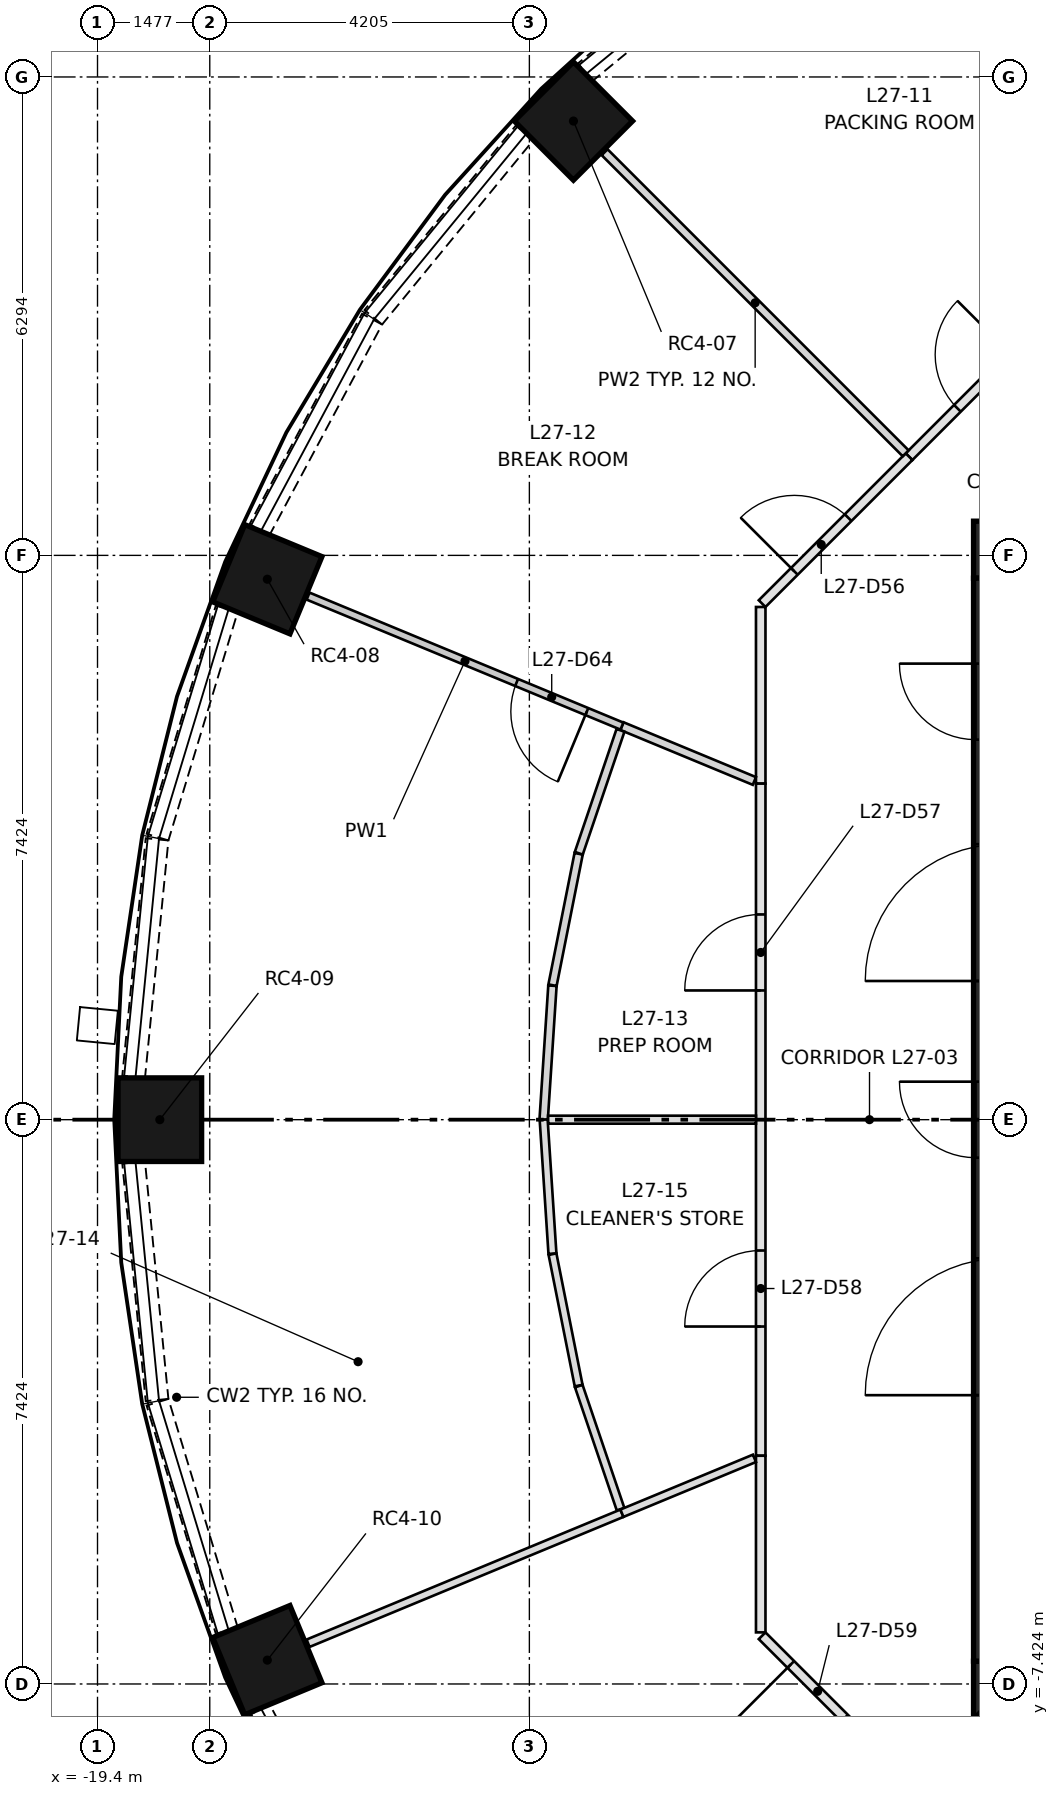
"""IFC4 building model, lengths in metres.
Left out: names, types, materials, properties, quantities, classifications, styles, units other than length and angle.
Written with IfcOpenShell. Run it as: python <this file> out.ifc"""

import sys

from ifc_helpers import new_model, si_unit, direction, frame, frame_2d, origin, origin_2d, place, context, subcontext, project, spatial, rectangle, extrude, element, fill, save


model = new_model("IFC4")
c1 = context("Model", 3, precision=1e-05, world=origin(), true_north=direction((0.0, 1.0)))
c2 = subcontext(c1, "Body", "Model", "MODEL_VIEW")
j1 = project(units=[si_unit("LENGTHUNIT", "METRE"), si_unit("PLANEANGLEUNIT", "RADIAN")], contexts=[c1])
p1 = place(None, origin())
s1 = spatial("IfcSite", under=j1, at=p1, CompositionType="ELEMENT")
p2 = place(p1, origin())
s2 = spatial("IfcBuilding", under=s1, at=p2, CompositionType="ELEMENT")
p3 = place(p2, frame((0.0, 0.0, 105.6)))
s3 = spatial("IfcBuildingStorey", under=s2, at=p3, CompositionType="ELEMENT", Elevation=105.6)
for number, where, z_axis, x_axis in (
    (1, (-13.138, 13.138, 0.0), (0.0, 0.0, 1.0), (-0.707, 0.707, 0.0)),
    (2, (-17.166, 7.11, 0.0), (0.0, 0.0, 1.0), (-0.924, 0.383, 0.0)),
    (3, (-18.58, 0.0, 0.0), (0.0, 0.0, 1.0), (-1.0, 0.0, 0.0)),
    (4, (-17.166, -7.11, 0.0), (0.0, 0.0, 1.0), (-0.924, -0.383, 0.0)),
):
    element("IfcColumn", number, at=place(p3, frame(where, z_axis=z_axis, x_axis=x_axis)), inside=s3, PredefinedType="COLUMN", context=c2, shape_type="SweptSolid", body=[
        extrude(rectangle(XDim=1.1, YDim=1.1, at=origin_2d()), origin(), (0.0, 0.0, 1.0), 3.65),
    ])
for number, where, z_axis, x_axis in (
    (5, (-7.874, -7.499, 0.0), (0.0, 0.0, 1.0), (1.0, 0.0, 0.0)),
    (6, (-7.874, 7.499, 0.0), (0.0, 0.0, 1.0), (1.0, 0.0, 0.0)),
):
    element("IfcWall", number, at=place(p3, frame(where, z_axis=z_axis, x_axis=x_axis)), inside=s3, PredefinedType="SHEAR", context=c2, shape_type="SweptSolid", body=[
        extrude(rectangle(XDim=15.748, YDim=0.75, at=frame_2d((7.874, 0.0))), origin(), (0.0, 0.0, 1.0), 3.65),
    ])
p4 = place(p3, frame((-7.499, -7.124, 0.0), z_axis=(0.0, 0.0, 1.0), x_axis=(0.0, 1.0, 0.0)))
e7 = element("IfcWall", 7, at=p4, inside=s3, PredefinedType="SHEAR", context=c2, shape_type="SweptSolid", body=[
    extrude(rectangle(XDim=14.248, YDim=0.75, at=frame_2d((7.124, 0.0))), origin(), (0.0, 0.0, 1.0), 3.65),
])
p5 = place(p4, frame((6.624, 0.0, 0.0)))
e8 = element("IfcOpeningElement", 8, at=p5, cuts=e7, PredefinedType="OPENING", context=c2, shape_type="SweptSolid", body=[
    extrude(rectangle(XDim=1.0, YDim=2.1, at=frame_2d((0.5, 1.05))), frame((0.0, 0.385, 0.0), z_axis=(0.0, -1.0, 0.0), x_axis=(1.0, 0.0, 0.0)), (0.0, 0.0, 1.0), 0.77),
])
p6 = place(p4, frame((3.5, 0.0, 0.0)))
e9 = element("IfcOpeningElement", 9, at=p6, cuts=e7, PredefinedType="OPENING", context=c2, shape_type="SweptSolid", body=[
    extrude(rectangle(XDim=1.8, YDim=2.1, at=frame_2d((0.9, 1.05))), frame((0.0, 0.385, 0.0), z_axis=(0.0, -1.0, 0.0), x_axis=(1.0, 0.0, 0.0)), (0.0, 0.0, 1.0), 0.77),
])
p7 = place(p4, frame((8.948, 0.0, 0.0)))
e10 = element("IfcOpeningElement", 10, at=p7, cuts=e7, PredefinedType="OPENING", context=c2, shape_type="SweptSolid", body=[
    extrude(rectangle(XDim=1.8, YDim=2.1, at=frame_2d((0.9, 1.05))), frame((0.0, 0.385, 0.0), z_axis=(0.0, -1.0, 0.0), x_axis=(1.0, 0.0, 0.0)), (0.0, 0.0, 1.0), 0.77),
])
p8 = place(p4, frame((12.124, 0.0, 0.0)))
e11 = element("IfcOpeningElement", 11, at=p8, cuts=e7, PredefinedType="OPENING", context=c2, shape_type="SweptSolid", body=[
    extrude(rectangle(XDim=1.0, YDim=2.1, at=frame_2d((0.5, 1.05))), frame((0.0, 0.385, 0.0), z_axis=(0.0, -1.0, 0.0), x_axis=(1.0, 0.0, 0.0)), (0.0, 0.0, 1.0), 0.77),
])
for number, where, z_axis, x_axis in (
    (12, (-10.557, 15.771, 0.0), (0.0, 0.0, 1.0), (-0.773, -0.634, 0.0)),
    (13, (-13.781, 12.983, 0.0), (0.0, 0.0, 1.0), (-0.634, -0.773, 0.0)),
):
    element("IfcWall", number, at=place(p3, frame(where, z_axis=z_axis, x_axis=x_axis)), inside=s3, PredefinedType="SOLIDWALL", context=c2, shape_type="SweptSolid", body=[
        extrude(rectangle(XDim=3.139, YDim=0.3, at=frame_2d((1.569, 0.0))), origin(), (0.0, 0.0, 1.0), 0.9),
    ])
p9 = place(p3, frame((-15.788, 10.532, 0.0), z_axis=(0.0, 0.0, 1.0), x_axis=(-0.471375185282, -0.88193278355, 0.0)))
e14 = element("IfcWall", 14, at=p9, inside=s3, PredefinedType="SOLIDWALL", context=c2, shape_type="SweptSolid", body=[
    extrude(rectangle(XDim=3.139, YDim=0.3, at=frame_2d((1.57, 0.0))), origin(), (0.0, 0.0, 1.0), 0.9),
])
p10 = place(p3, frame((-17.699, 6.722, 0.0), z_axis=(0.0, 0.0, 1.0), x_axis=(-0.290214584271, -0.956961595403, 0.0)))
e15 = element("IfcWall", 15, at=p10, inside=s3, PredefinedType="SOLIDWALL", context=c2, shape_type="SweptSolid", body=[
    extrude(rectangle(XDim=3.139, YDim=0.3, at=frame_2d((1.57, 0.0))), origin(), (0.0, 0.0, 1.0), 0.9),
])
for number, where, z_axis, x_axis in (
    (16, (-18.616, 3.688, 0.0), (0.0, 0.0, 1.0), (-0.098, -0.995, 0.0)),
    (17, (-18.925, -0.564, 0.0), (0.0, 0.0, 1.0), (0.098, -0.995, 0.0)),
):
    element("IfcWall", number, at=place(p3, frame(where, z_axis=z_axis, x_axis=x_axis)), inside=s3, PredefinedType="SOLIDWALL", context=c2, shape_type="SweptSolid", body=[
        extrude(rectangle(XDim=3.139, YDim=0.3, at=frame_2d((1.57, 0.0))), origin(), (0.0, 0.0, 1.0), 0.9),
    ])
p11 = place(p3, frame((-18.611, -3.717, 0.0), z_axis=(0.0, 0.0, 1.0), x_axis=(0.290214584271, -0.956961595403, 0.0)))
e18 = element("IfcWall", 18, at=p11, inside=s3, PredefinedType="SOLIDWALL", context=c2, shape_type="SweptSolid", body=[
    extrude(rectangle(XDim=3.139, YDim=0.3, at=frame_2d((1.57, 0.0))), origin(), (0.0, 0.0, 1.0), 0.9),
])
p12 = place(p3, frame((-17.268, -7.763, 0.0), z_axis=(0.0, 0.0, 1.0), x_axis=(0.471375185282, -0.88193278355, 0.0)))
e19 = element("IfcWall", 19, at=p12, inside=s3, PredefinedType="SOLIDWALL", context=c2, shape_type="SweptSolid", body=[
    extrude(rectangle(XDim=3.139, YDim=0.3, at=frame_2d((1.57, 0.0))), origin(), (0.0, 0.0, 1.0), 0.9),
])
p13 = place(p3, frame((-8.722, 8.722, 0.0), z_axis=(0.0, 0.0, 1.0), x_axis=(0.707062130741, 0.707151428813, 0.0)))
e20 = element("IfcWall", 20, at=p13, inside=s3, PredefinedType="PARTITIONING", context=c2, shape_type="SweptSolid", body=[
    extrude(rectangle(XDim=2.734, YDim=0.125, at=frame_2d((1.367, 0.0))), origin(), (0.0, 0.0, 1.0), 3.3),
])
p14 = place(p13, frame((0.9, 0.0, 0.0)))
e21 = element("IfcOpeningElement", 21, at=p14, cuts=e20, PredefinedType="OPENING", context=c2, shape_type="SweptSolid", body=[
    extrude(rectangle(XDim=1.0, YDim=2.1, at=frame_2d((0.5, 1.05))), frame((0.0, 0.073, 0.0), z_axis=(0.0, -1.0, 0.0), x_axis=(1.0, 0.0, 0.0)), (0.0, 0.0, 1.0), 0.145),
])
p15 = place(p3, frame((-10.674, 4.421, 0.0), z_axis=(0.0, 0.0, 1.0), x_axis=(0.0, 1.0, 0.0)))
e22 = element("IfcWall", 22, at=p15, inside=s3, PredefinedType="PARTITIONING", context=c2, shape_type="SweptSolid", body=[
    extrude(rectangle(XDim=2.324, YDim=0.125, at=frame_2d((1.162, 0.0))), origin(), (0.0, 0.0, 1.0), 3.3),
])
p16 = place(p3, frame((-10.656, 6.789, 0.0), z_axis=(0.0, 0.0, 1.0), x_axis=(0.707151428813, 0.707062130741, 0.0)))
e23 = element("IfcWall", 23, at=p16, inside=s3, PredefinedType="PARTITIONING", context=c2, shape_type="SweptSolid", body=[
    extrude(rectangle(XDim=2.734, YDim=0.125, at=frame_2d((1.367, 0.0))), origin(), (0.0, 0.0, 1.0), 3.3),
])
p17 = place(p16, frame((0.6, 0.0, 0.0)))
e24 = element("IfcOpeningElement", 24, at=p17, cuts=e23, PredefinedType="OPENING", context=c2, shape_type="SweptSolid", body=[
    extrude(rectangle(XDim=1.0, YDim=2.1, at=frame_2d((0.5, 1.05))), frame((0.0, 0.073, 0.0), z_axis=(0.0, -1.0, 0.0), x_axis=(1.0, 0.0, 0.0)), (0.0, 0.0, 1.0), 0.145),
])
p18 = place(p3, frame((-10.674, 0.0, 0.0), z_axis=(0.0, 0.0, 1.0), x_axis=(0.0, 1.0, 0.0)))
e25 = element("IfcWall", 25, at=p18, inside=s3, PredefinedType="PARTITIONING", context=c2, shape_type="SweptSolid", body=[
    extrude(rectangle(XDim=4.421, YDim=0.125, at=frame_2d((2.211, 0.0))), origin(), (0.0, 0.0, 1.0), 3.3),
])
p19 = place(p18, frame((1.7, 0.0, 0.0)))
e26 = element("IfcOpeningElement", 26, at=p19, cuts=e25, PredefinedType="OPENING", context=c2, shape_type="SweptSolid", body=[
    extrude(rectangle(XDim=1.0, YDim=2.1, at=frame_2d((0.5, 1.05))), frame((0.0, 0.073, 0.0), z_axis=(0.0, -1.0, 0.0), x_axis=(1.0, 0.0, 0.0)), (0.0, 0.0, 1.0), 0.145),
])
p20 = place(p3, frame((-10.674, -4.421, 0.0), z_axis=(0.0, 0.0, 1.0), x_axis=(0.0, 1.0, 0.0)))
e27 = element("IfcWall", 27, at=p20, inside=s3, PredefinedType="PARTITIONING", context=c2, shape_type="SweptSolid", body=[
    extrude(rectangle(XDim=4.421, YDim=0.125, at=frame_2d((2.211, 0.0))), origin(), (0.0, 0.0, 1.0), 3.3),
])
p21 = place(p20, frame((1.7, 0.0, 0.0)))
e28 = element("IfcOpeningElement", 28, at=p21, cuts=e27, PredefinedType="OPENING", context=c2, shape_type="SweptSolid", body=[
    extrude(rectangle(XDim=1.0, YDim=2.1, at=frame_2d((0.5, 1.05))), frame((0.0, 0.073, 0.0), z_axis=(0.0, -1.0, 0.0), x_axis=(1.0, 0.0, 0.0)), (0.0, 0.0, 1.0), 0.145),
])
p22 = place(p3, frame((-10.674, -6.745, 0.0), z_axis=(0.0, 0.0, 1.0), x_axis=(0.0, 1.0, 0.0)))
e29 = element("IfcWall", 29, at=p22, inside=s3, PredefinedType="PARTITIONING", context=c2, shape_type="SweptSolid", body=[
    extrude(rectangle(XDim=2.324, YDim=0.125, at=frame_2d((1.162, 0.0))), origin(), (0.0, 0.0, 1.0), 3.3),
])
p23 = place(p3, frame((-8.722, -8.722, 0.0), z_axis=(0.0, 0.0, 1.0), x_axis=(-0.707151428813, 0.707062130741, 0.0)))
e30 = element("IfcWall", 30, at=p23, inside=s3, PredefinedType="PARTITIONING", context=c2, shape_type="SweptSolid", body=[
    extrude(rectangle(XDim=2.734, YDim=0.125, at=frame_2d((1.367, 0.0))), origin(), (0.0, 0.0, 1.0), 3.3),
])
p24 = place(p23, frame((1.2, 0.0, 0.0)))
e31 = element("IfcOpeningElement", 31, at=p24, cuts=e30, PredefinedType="OPENING", context=c2, shape_type="SweptSolid", body=[
    extrude(rectangle(XDim=1.0, YDim=2.1, at=frame_2d((0.5, 1.05))), frame((0.0, 0.073, 0.0), z_axis=(0.0, -1.0, 0.0), x_axis=(1.0, 0.0, 0.0)), (0.0, 0.0, 1.0), 0.145),
])
p25 = place(p3, frame((-8.767, 8.767, 0.0), z_axis=(0.0, 0.0, 1.0), x_axis=(-0.707106781187, 0.707106781187, 0.0)))
e32 = element("IfcWall", 32, at=p25, inside=s3, PredefinedType="PARTITIONING", context=c2, shape_type="SweptSolid", body=[
    extrude(rectangle(XDim=5.602, YDim=0.11, at=frame_2d((2.801, 0.0))), origin(), (0.0, 0.0, 1.0), 3.3),
])
p26 = place(p3, frame((-10.758, 4.456, 0.0), z_axis=(0.0, 0.0, 1.0), x_axis=(-0.923844847366, 0.382767158983, 0.0)))
e33 = element("IfcWall", 33, at=p26, inside=s3, PredefinedType="PARTITIONING", context=c2, shape_type="SweptSolid", body=[
    extrude(rectangle(XDim=1.886, YDim=0.11, at=frame_2d((0.943, 0.0))), origin(), (0.0, 0.0, 1.0), 3.3),
])
p27 = place(p3, frame((-12.5, 5.178, 0.0), z_axis=(0.0, 0.0, 1.0), x_axis=(-0.923895686767, 0.382644430213, 0.0)))
e34 = element("IfcWall", 34, at=p27, inside=s3, PredefinedType="PARTITIONING", context=c2, shape_type="SweptSolid", body=[
    extrude(rectangle(XDim=4.47, YDim=0.1, at=frame_2d((2.235, 0.0))), origin(), (0.0, 0.0, 1.0), 3.3),
])
p28 = place(p27, frame((0.5, 0.0, 0.0)))
e35 = element("IfcOpeningElement", 35, at=p28, cuts=e34, PredefinedType="OPENING", context=c2, shape_type="SweptSolid", body=[
    extrude(rectangle(XDim=1.0, YDim=2.1, at=frame_2d((0.5, 1.05))), frame((0.0, 0.06, 0.0), z_axis=(0.0, -1.0, 0.0), x_axis=(1.0, 0.0, 0.0)), (0.0, 0.0, 1.0), 0.12),
])
p29 = place(p3, frame((-13.53, 0.0, 0.0), z_axis=(0.0, 0.0, 1.0), x_axis=(0.06551898146, 0.997851323128, 0.0)))
e36 = element("IfcWall", 36, at=p29, inside=s3, PredefinedType="PARTITIONING", context=c2, shape_type="SweptSolid", body=[
    extrude(rectangle(XDim=1.766, YDim=0.11, at=frame_2d((0.883, 0.0))), origin(), (0.0, 0.0, 1.0), 3.3),
])
p30 = place(p3, frame((-13.414, 1.77, 0.0), z_axis=(0.0, 0.0, 1.0), x_axis=(0.195157142921, 0.980771986532, 0.0)))
e37 = element("IfcWall", 37, at=p30, inside=s3, PredefinedType="PARTITIONING", context=c2, shape_type="SweptSolid", body=[
    extrude(rectangle(XDim=1.763, YDim=0.11, at=frame_2d((0.881, 0.0))), origin(), (0.0, 0.0, 1.0), 3.3),
])
p31 = place(p3, frame((-13.068, 3.505, 0.0), z_axis=(0.0, 0.0, 1.0), x_axis=(0.321413111924, 0.946939074853, 0.0)))
e38 = element("IfcWall", 38, at=p31, inside=s3, PredefinedType="PARTITIONING", context=c2, shape_type="SweptSolid", body=[
    extrude(rectangle(XDim=1.708, YDim=0.11, at=frame_2d((0.854, 0.0))), origin(), (0.0, 0.0, 1.0), 3.3),
])
p32 = place(p3, frame((-10.737, 0.0, 0.0), z_axis=(0.0, 0.0, 1.0), x_axis=(-1.0, 0.0, 0.0)))
e39 = element("IfcWall", 39, at=p32, inside=s3, PredefinedType="PARTITIONING", context=c2, shape_type="SweptSolid", body=[
    extrude(rectangle(XDim=2.735, YDim=0.105, at=frame_2d((1.367, 0.0))), origin(), (0.0, 0.0, 1.0), 3.3),
])
p33 = place(p3, frame((-13.53, 0.0, 0.0), z_axis=(0.0, 0.0, 1.0), x_axis=(0.065509945756, -0.997851916372, 0.0)))
e40 = element("IfcWall", 40, at=p33, inside=s3, PredefinedType="PARTITIONING", context=c2, shape_type="SweptSolid", body=[
    extrude(rectangle(XDim=1.767, YDim=0.105, at=frame_2d((0.883, 0.0))), origin(), (0.0, 0.0, 1.0), 3.3),
])
p34 = place(p3, frame((-13.414, -1.769, 0.0), z_axis=(0.0, 0.0, 1.0), x_axis=(0.19513063546, -0.980777260699, 0.0)))
e41 = element("IfcWall", 41, at=p34, inside=s3, PredefinedType="PARTITIONING", context=c2, shape_type="SweptSolid", body=[
    extrude(rectangle(XDim=1.763, YDim=0.105, at=frame_2d((0.881, 0.0))), origin(), (0.0, 0.0, 1.0), 3.3),
])
p35 = place(p3, frame((-13.068, -3.505, 0.0), z_axis=(0.0, 0.0, 1.0), x_axis=(0.321490655205, -0.946912751322, 0.0)))
e42 = element("IfcWall", 42, at=p35, inside=s3, PredefinedType="PARTITIONING", context=c2, shape_type="SweptSolid", body=[
    extrude(rectangle(XDim=1.71, YDim=0.105, at=frame_2d((0.855, 0.0))), origin(), (0.0, 0.0, 1.0), 3.3),
])
p36 = place(p3, frame((-12.5, -5.178, 0.0), z_axis=(0.0, 0.0, 1.0), x_axis=(-0.923895686767, -0.382644430213, 0.0)))
e43 = element("IfcWall", 43, at=p36, inside=s3, PredefinedType="PARTITIONING", context=c2, shape_type="SweptSolid", body=[
    extrude(rectangle(XDim=4.47, YDim=0.105, at=frame_2d((2.235, 0.0))), origin(), (0.0, 0.0, 1.0), 3.3),
])
p37 = place(p3, frame((-10.757, -4.456, 0.0), z_axis=(0.0, 0.0, 1.0), x_axis=(-0.923874914803, -0.382694580309, 0.0)))
e44 = element("IfcWall", 44, at=p37, inside=s3, PredefinedType="PARTITIONING", context=c2, shape_type="SweptSolid", body=[
    extrude(rectangle(XDim=1.887, YDim=0.105, at=frame_2d((0.943, 0.0))), origin(), (0.0, 0.0, 1.0), 3.3),
])
p38 = place(p5, origin())
e45 = element("IfcDoor", 45, at=p38, inside=s3, OperationType="SINGLE_SWING_RIGHT", PredefinedType="DOOR", context=c2, shape_type="SweptSolid", body=[
    extrude(rectangle(XDim=1.0, YDim=2.1, at=frame_2d((0.5, 1.05))), frame((0.0, 0.375, 0.0), z_axis=(0.0, -1.0, 0.0), x_axis=(1.0, 0.0, 0.0)), (0.0, 0.0, 1.0), 0.05),
])
fill(e8, e45)
p39 = place(p8, origin())
e46 = element("IfcDoor", 46, at=p39, inside=s3, OperationType="SINGLE_SWING_RIGHT", PredefinedType="DOOR", context=c2, shape_type="SweptSolid", body=[
    extrude(rectangle(XDim=1.0, YDim=2.1, at=frame_2d((0.5, 1.05))), frame((0.0, 0.375, 0.0), z_axis=(0.0, -1.0, 0.0), x_axis=(1.0, 0.0, 0.0)), (0.0, 0.0, 1.0), 0.05),
])
fill(e11, e46)
p40 = place(p14, origin())
e47 = element("IfcDoor", 47, at=p40, inside=s3, OperationType="SINGLE_SWING_RIGHT", PredefinedType="DOOR", context=c2, shape_type="SweptSolid", body=[
    extrude(rectangle(XDim=1.0, YDim=2.1, at=frame_2d((0.5, 1.05))), frame((0.0, 0.025, 0.0), z_axis=(0.0, -1.0, 0.0), x_axis=(1.0, 0.0, 0.0)), (0.0, 0.0, 1.0), 0.05),
])
fill(e21, e47)
p41 = place(p17, origin())
e48 = element("IfcDoor", 48, at=p41, inside=s3, OperationType="SINGLE_SWING_LEFT", PredefinedType="DOOR", context=c2, shape_type="SweptSolid", body=[
    extrude(rectangle(XDim=1.0, YDim=2.1, at=frame_2d((0.5, 1.05))), frame((0.0, 0.025, 0.0), z_axis=(0.0, -1.0, 0.0), x_axis=(1.0, 0.0, 0.0)), (0.0, 0.0, 1.0), 0.05),
])
fill(e24, e48)
p42 = place(p19, origin())
e49 = element("IfcDoor", 49, at=p42, inside=s3, OperationType="SINGLE_SWING_LEFT", PredefinedType="DOOR", context=c2, shape_type="SweptSolid", body=[
    extrude(rectangle(XDim=1.0, YDim=2.1, at=frame_2d((0.5, 1.05))), frame((0.0, 0.025, 0.0), z_axis=(0.0, -1.0, 0.0), x_axis=(1.0, 0.0, 0.0)), (0.0, 0.0, 1.0), 0.05),
])
fill(e26, e49)
p43 = place(p21, origin())
e50 = element("IfcDoor", 50, at=p43, inside=s3, OperationType="SINGLE_SWING_LEFT", PredefinedType="DOOR", context=c2, shape_type="SweptSolid", body=[
    extrude(rectangle(XDim=1.0, YDim=2.1, at=frame_2d((0.5, 1.05))), frame((0.0, 0.025, 0.0), z_axis=(0.0, -1.0, 0.0), x_axis=(1.0, 0.0, 0.0)), (0.0, 0.0, 1.0), 0.05),
])
fill(e28, e50)
p44 = place(p24, origin())
e51 = element("IfcDoor", 51, at=p44, inside=s3, OperationType="SINGLE_SWING_RIGHT", PredefinedType="DOOR", context=c2, shape_type="SweptSolid", body=[
    extrude(rectangle(XDim=1.0, YDim=2.1, at=frame_2d((0.5, 1.05))), frame((0.0, 0.025, 0.0), z_axis=(0.0, -1.0, 0.0), x_axis=(1.0, 0.0, 0.0)), (0.0, 0.0, 1.0), 0.05),
])
fill(e31, e51)
p45 = place(p28, origin())
e52 = element("IfcDoor", 52, at=p45, inside=s3, OperationType="SINGLE_SWING_LEFT", PredefinedType="DOOR", context=c2, shape_type="SweptSolid", body=[
    extrude(rectangle(XDim=1.0, YDim=2.1, at=frame_2d((0.5, 1.05))), frame((0.0, 0.025, 0.0), z_axis=(0.0, -1.0, 0.0), x_axis=(1.0, 0.0, 0.0)), (0.0, 0.0, 1.0), 0.05),
])
fill(e35, e52)
save(model, sys.argv[1])
